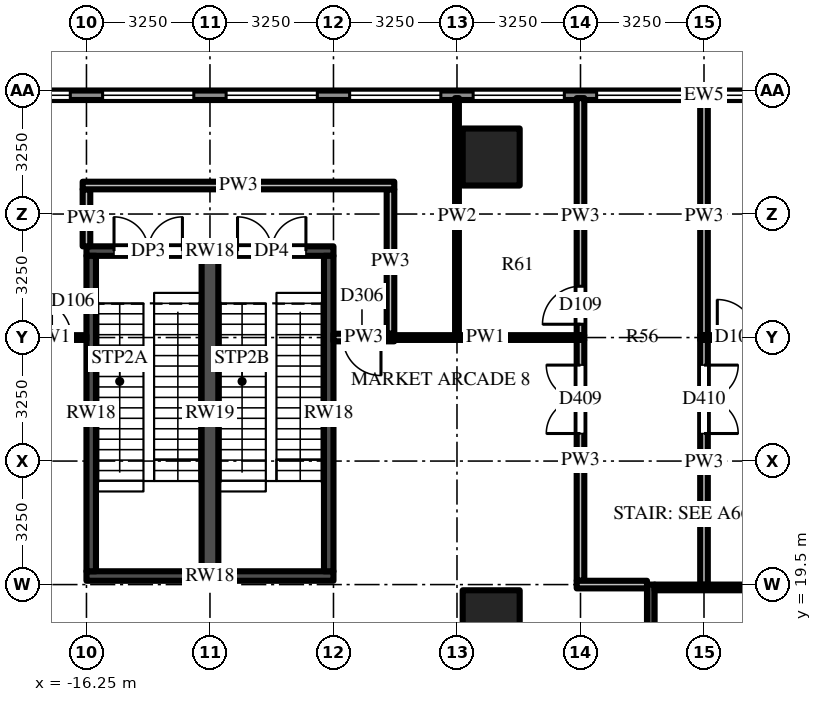
"""IFC4 building model, lengths in metres.
Left out: names, types, materials, properties, quantities, classifications, styles, units other than length and angle.
Written with IfcOpenShell. Run it as: python <this file> out.ifc"""

import sys

from ifc_helpers import new_model, si_unit, direction, frame, frame_2d, origin, origin_2d, place, context, subcontext, project, spatial, rectangle, extrude, source, transform, mapped, element, fill, save


model = new_model("IFC4")
c1 = context("Model", 3, precision=1e-05, world=origin(), true_north=direction((0.0, 1.0)))
c2 = subcontext(c1, "Body", "Model", "MODEL_VIEW")
j1 = project(units=[si_unit("LENGTHUNIT", "METRE"), si_unit("PLANEANGLEUNIT", "RADIAN")], contexts=[c1])
p1 = place(None, origin())
s1 = spatial("IfcSite", under=j1, at=p1, CompositionType="ELEMENT")
p2 = place(p1, origin())
s2 = spatial("IfcBuilding", under=s1, at=p2, CompositionType="ELEMENT")
p3 = place(p2, frame((0.0, 0.0, 24.0)))
s3 = spatial("IfcBuildingStorey", under=s2, at=p3, CompositionType="ELEMENT", Elevation=24.0)
m1 = source(origin(), c2, "Body", "SweptSolid", [
    extrude(rectangle(XDim=1.5, YDim=1.5, at=origin_2d()), origin(), (0.0, 0.0, 1.0), 5.0),
])
for number, where, z_axis, x_axis in (
    (1, (-5.6, 18.6, 0.0), (0.0, 0.0, 1.0), (1.0, 0.0, 0.0)),
    (2, (-5.6, 30.75, 0.0), (0.0, 0.0, 1.0), (1.0, 0.0, 0.0)),
):
    element("IfcColumn", number, at=place(p3, frame(where, z_axis=z_axis, x_axis=x_axis)), inside=s3, PredefinedType="COLUMN", context=c2, shape_type="MappedRepresentation", body=[
        mapped(m1, transform((0.0, 0.0, 0.0))),
    ])
m2 = source(origin(), c2, "Body", "SweptSolid", [
    extrude(rectangle(XDim=6.0, YDim=0.2, at=frame_2d((3.0, 0.0))), origin(), (0.0, 0.0, 1.0), 4.7),
])
p4 = place(p3, frame((-1.4, 13.5, 0.0), z_axis=(0.0, 0.0, 1.0), x_axis=(0.0, 1.0, 0.0)))
e3 = element("IfcWall", 3, at=p4, inside=s3, PredefinedType="SHEAR", context=c2, shape_type="MappedRepresentation", body=[
    mapped(m2, transform((0.0, 0.0, 0.0))),
])
m3 = source(origin(), c2, "Body", "SweptSolid", [
    extrude(rectangle(XDim=2.6, YDim=0.15, at=frame_2d((1.3, 0.0))), origin(), (0.0, 0.0, 1.0), 4.7),
])
p5 = place(p3, frame((-1.3, 19.425, 0.0), z_axis=(0.0, 0.0, 1.0), x_axis=(1.0, 0.0, 0.0)))
e4 = element("IfcWall", 4, at=p5, inside=s3, PredefinedType="SHEAR", context=c2, shape_type="MappedRepresentation", body=[
    mapped(m3, transform((0.0, 0.0, 0.0))),
])
m4 = source(origin(), c2, "Body", "SweptSolid", [
    extrude(rectangle(XDim=6.5, YDim=0.25, at=frame_2d((3.25, 0.0))), origin(), (0.0, 0.0, 1.0), 4.7),
])
p6 = place(p3, frame((-16.25, 28.275, 0.0), z_axis=(0.0, 0.0, 1.0), x_axis=(1.0, 0.0, 0.0)))
e5 = element("IfcWall", 5, at=p6, inside=s3, PredefinedType="SHEAR", context=c2, shape_type="MappedRepresentation", body=[
    mapped(m4, transform((0.0, 0.0, 0.0))),
])
m5 = source(origin(), c2, "Body", "SweptSolid", [
    extrude(rectangle(XDim=1.8, YDim=2.1, at=frame_2d((0.9, 1.05))), frame((0.0, 0.135, 0.0), z_axis=(0.0, -1.0, 0.0), x_axis=(1.0, 0.0, 0.0)), (0.0, 0.0, 1.0), 0.27),
])
p7 = place(p6, frame((0.725, 0.0, 0.0)))
e6 = element("IfcOpeningElement", 6, at=p7, cuts=e5, PredefinedType="OPENING", context=c2, shape_type="MappedRepresentation", body=[
    mapped(m5, transform((0.0, 0.0, 0.0))),
])
p8 = place(p6, frame((3.975, 0.0, 0.0)))
e7 = element("IfcOpeningElement", 7, at=p8, cuts=e5, PredefinedType="OPENING", context=c2, shape_type="MappedRepresentation", body=[
    mapped(m5, transform((0.0, 0.0, 0.0))),
])
p9 = place(p3, frame((-16.25, 19.725, 0.0), z_axis=(0.0, 0.0, 1.0), x_axis=(1.0, 0.0, 0.0)))
e8 = element("IfcWall", 8, at=p9, inside=s3, PredefinedType="SHEAR", context=c2, shape_type="MappedRepresentation", body=[
    mapped(m4, transform((0.0, 0.0, 0.0))),
])
m6 = source(origin(), c2, "Body", "SweptSolid", [
    extrude(rectangle(XDim=8.3, YDim=0.25, at=frame_2d((4.15, 0.0))), origin(), (0.0, 0.0, 1.0), 4.7),
])
for number, where, z_axis, x_axis in (
    (9, (-16.125, 19.85, 0.0), (0.0, 0.0, 1.0), (0.0, 1.0, 0.0)),
    (10, (-9.875, 19.85, 0.0), (0.0, 0.0, 1.0), (0.0, 1.0, 0.0)),
):
    element("IfcWall", number, at=place(p3, frame(where, z_axis=z_axis, x_axis=x_axis)), inside=s3, PredefinedType="SHEAR", context=c2, shape_type="MappedRepresentation", body=[
        mapped(m6, transform((0.0, 0.0, 0.0))),
    ])
m7 = source(origin(), c2, "Body", "SweptSolid", [
    extrude(rectangle(XDim=8.3, YDim=0.44, at=frame_2d((4.15, 0.0))), origin(), (0.0, 0.0, 1.0), 4.7),
])
p10 = place(p3, frame((-13.0, 19.85, 0.0), z_axis=(0.0, 0.0, 1.0), x_axis=(0.0, 1.0, 0.0)))
e11 = element("IfcWall", 11, at=p10, inside=s3, PredefinedType="SHEAR", context=c2, shape_type="MappedRepresentation", body=[
    mapped(m7, transform((0.0, 0.0, 0.0))),
])
m8 = source(origin(), c2, "Body", "SweptSolid", [
    extrude(rectangle(XDim=58.5, YDim=0.25, at=frame_2d((29.25, 0.0))), origin(), (0.0, 0.0, 1.0), 4.7),
])
p11 = place(p3, frame((29.25, 32.375, 0.0), z_axis=(0.0, 0.0, 1.0), x_axis=(-1.0, 0.0, 0.0)))
e12 = element("IfcWall", 12, at=p11, inside=s3, PredefinedType="SOLIDWALL", context=c2, shape_type="MappedRepresentation", body=[
    mapped(m8, transform((0.0, 0.0, 0.0))),
])
m9 = source(origin(), c2, "Body", "SweptSolid", [
    extrude(rectangle(XDim=2.4, YDim=3.3, at=frame_2d((1.2, 1.65))), frame((0.0, 0.135, 0.0), z_axis=(0.0, -1.0, 0.0), x_axis=(1.0, 0.0, 0.0)), (0.0, 0.0, 1.0), 0.27),
])
p12 = place(p11, frame((0.425, 0.0, 0.6)))
e13 = element("IfcOpeningElement", 13, at=p12, cuts=e12, PredefinedType="OPENING", context=c2, shape_type="MappedRepresentation", body=[
    mapped(m9, transform((0.0, 0.0, 0.0))),
])
p13 = place(p11, frame((3.675, 0.0, 0.6)))
e14 = element("IfcOpeningElement", 14, at=p13, cuts=e12, PredefinedType="OPENING", context=c2, shape_type="MappedRepresentation", body=[
    mapped(m9, transform((0.0, 0.0, 0.0))),
])
p14 = place(p11, frame((6.925, 0.0, 0.6)))
e15 = element("IfcOpeningElement", 15, at=p14, cuts=e12, PredefinedType="OPENING", context=c2, shape_type="MappedRepresentation", body=[
    mapped(m9, transform((0.0, 0.0, 0.0))),
])
p15 = place(p11, frame((10.175, 0.0, 0.6)))
e16 = element("IfcOpeningElement", 16, at=p15, cuts=e12, PredefinedType="OPENING", context=c2, shape_type="MappedRepresentation", body=[
    mapped(m9, transform((0.0, 0.0, 0.0))),
])
m10 = source(origin(), c2, "Body", "SweptSolid", [
    extrude(rectangle(XDim=1.8, YDim=2.4, at=frame_2d((0.9, 1.2))), frame((0.0, 0.135, 0.0), z_axis=(0.0, -1.0, 0.0), x_axis=(1.0, 0.0, 0.0)), (0.0, 0.0, 1.0), 0.27),
])
p16 = place(p11, frame((13.725, 0.0, 0.0)))
e17 = element("IfcOpeningElement", 17, at=p16, cuts=e12, PredefinedType="OPENING", context=c2, shape_type="MappedRepresentation", body=[
    mapped(m10, transform((0.0, 0.0, 0.0))),
])
p17 = place(p11, frame((16.675, 0.0, 0.6)))
e18 = element("IfcOpeningElement", 18, at=p17, cuts=e12, PredefinedType="OPENING", context=c2, shape_type="MappedRepresentation", body=[
    mapped(m9, transform((0.0, 0.0, 0.0))),
])
p18 = place(p11, frame((19.925, 0.0, 0.6)))
e19 = element("IfcOpeningElement", 19, at=p18, cuts=e12, PredefinedType="OPENING", context=c2, shape_type="MappedRepresentation", body=[
    mapped(m9, transform((0.0, 0.0, 0.0))),
])
p19 = place(p11, frame((23.175, 0.0, 0.6)))
e20 = element("IfcOpeningElement", 20, at=p19, cuts=e12, PredefinedType="OPENING", context=c2, shape_type="MappedRepresentation", body=[
    mapped(m9, transform((0.0, 0.0, 0.0))),
])
p20 = place(p11, frame((26.425, 0.0, 0.6)))
e21 = element("IfcOpeningElement", 21, at=p20, cuts=e12, PredefinedType="OPENING", context=c2, shape_type="MappedRepresentation", body=[
    mapped(m9, transform((0.0, 0.0, 0.0))),
])
p21 = place(p11, frame((29.675, 0.0, 0.6)))
e22 = element("IfcOpeningElement", 22, at=p21, cuts=e12, PredefinedType="OPENING", context=c2, shape_type="MappedRepresentation", body=[
    mapped(m9, transform((0.0, 0.0, 0.0))),
])
p22 = place(p11, frame((32.925, 0.0, 0.6)))
e23 = element("IfcOpeningElement", 23, at=p22, cuts=e12, PredefinedType="OPENING", context=c2, shape_type="MappedRepresentation", body=[
    mapped(m9, transform((0.0, 0.0, 0.0))),
])
p23 = place(p11, frame((36.175, 0.0, 0.6)))
e24 = element("IfcOpeningElement", 24, at=p23, cuts=e12, PredefinedType="OPENING", context=c2, shape_type="MappedRepresentation", body=[
    mapped(m9, transform((0.0, 0.0, 0.0))),
])
p24 = place(p11, frame((39.425, 0.0, 0.6)))
e25 = element("IfcOpeningElement", 25, at=p24, cuts=e12, PredefinedType="OPENING", context=c2, shape_type="MappedRepresentation", body=[
    mapped(m9, transform((0.0, 0.0, 0.0))),
])
p25 = place(p11, frame((42.675, 0.0, 0.6)))
e26 = element("IfcOpeningElement", 26, at=p25, cuts=e12, PredefinedType="OPENING", context=c2, shape_type="MappedRepresentation", body=[
    mapped(m9, transform((0.0, 0.0, 0.0))),
])
p26 = place(p11, frame((45.925, 0.0, 0.6)))
e27 = element("IfcOpeningElement", 27, at=p26, cuts=e12, PredefinedType="OPENING", context=c2, shape_type="MappedRepresentation", body=[
    mapped(m9, transform((0.0, 0.0, 0.0))),
])
p27 = place(p11, frame((49.175, 0.0, 0.6)))
e28 = element("IfcOpeningElement", 28, at=p27, cuts=e12, PredefinedType="OPENING", context=c2, shape_type="MappedRepresentation", body=[
    mapped(m9, transform((0.0, 0.0, 0.0))),
])
p28 = place(p11, frame((52.425, 0.0, 0.6)))
e29 = element("IfcOpeningElement", 29, at=p28, cuts=e12, PredefinedType="OPENING", context=c2, shape_type="MappedRepresentation", body=[
    mapped(m9, transform((0.0, 0.0, 0.0))),
])
p29 = place(p11, frame((55.675, 0.0, 0.6)))
e30 = element("IfcOpeningElement", 30, at=p29, cuts=e12, PredefinedType="OPENING", context=c2, shape_type="MappedRepresentation", body=[
    mapped(m9, transform((0.0, 0.0, 0.0))),
])
m11 = source(origin(), c2, "Body", "SweptSolid", [
    extrude(rectangle(XDim=1.5, YDim=0.2, at=frame_2d((0.75, 0.0))), origin(), (0.0, 0.0, 1.0), 4.7),
])
p30 = place(p3, frame((-16.25, 28.4, 0.0), z_axis=(0.0, 0.0, 1.0), x_axis=(0.0, 1.0, 0.0)))
e31 = element("IfcWall", 31, at=p30, inside=s3, PredefinedType="PARTITIONING", context=c2, shape_type="MappedRepresentation", body=[
    mapped(m11, transform((0.0, 0.0, 0.0))),
])
m12 = source(origin(), c2, "Body", "SweptSolid", [
    extrude(rectangle(XDim=3.8, YDim=0.2, at=frame_2d((1.9, 0.0))), origin(), (0.0, 0.0, 1.0), 4.274),
])
p31 = place(p3, frame((-8.25, 26.1, 0.0), z_axis=(0.0, 0.0, 1.0), x_axis=(0.0, 1.0, 0.0)))
e32 = element("IfcWall", 32, at=p31, inside=s3, PredefinedType="PARTITIONING", context=c2, shape_type="MappedRepresentation", body=[
    mapped(m12, transform((0.0, 0.0, 0.0))),
])
p32 = place(p3, frame((-6.5, 26.062, 0.0), z_axis=(0.0, 0.0, 1.0), x_axis=(0.0, 1.0, 0.0)))
e33 = element("IfcWall", 33, at=p32, inside=s3, PredefinedType="PARTITIONING", context=c2, shape_type="SweptSolid", body=[
    extrude(rectangle(XDim=6.238, YDim=0.1, at=frame_2d((3.119, 0.0))), origin(), (0.0, 0.0, 1.0), 3.762),
])
m13 = source(origin(), c2, "Body", "SweptSolid", [
    extrude(rectangle(XDim=3.188, YDim=0.2, at=frame_2d((1.594, 0.0))), origin(), (0.0, 0.0, 1.0), 4.7),
])
p33 = place(p3, frame((-3.25, 22.75, 0.0), z_axis=(0.0, 0.0, 1.0), x_axis=(0.0, 1.0, 0.0)))
e34 = element("IfcWall", 34, at=p33, inside=s3, PredefinedType="PARTITIONING", context=c2, shape_type="MappedRepresentation", body=[
    mapped(m13, transform((0.0, 0.0, 0.0))),
])
m14 = source(origin(), c2, "Body", "SweptSolid", [
    extrude(rectangle(XDim=1.8, YDim=2.1, at=frame_2d((0.9, 1.05))), frame((0.0, 0.11, 0.0), z_axis=(0.0, -1.0, 0.0), x_axis=(1.0, 0.0, 0.0)), (0.0, 0.0, 1.0), 0.22),
])
p34 = place(p33, frame((0.725, 0.0, 0.0)))
e35 = element("IfcOpeningElement", 35, at=p34, cuts=e34, PredefinedType="OPENING", context=c2, shape_type="MappedRepresentation", body=[
    mapped(m14, transform((0.0, 0.0, 0.0))),
])
m15 = source(origin(), c2, "Body", "SweptSolid", [
    extrude(rectangle(XDim=3.15, YDim=0.2, at=frame_2d((1.575, 0.0))), origin(), (0.0, 0.0, 1.0), 4.7),
])
p35 = place(p3, frame((-3.25, 19.6, 0.0), z_axis=(0.0, 0.0, 1.0), x_axis=(0.0, 1.0, 0.0)))
e36 = element("IfcWall", 36, at=p35, inside=s3, PredefinedType="PARTITIONING", context=c2, shape_type="MappedRepresentation", body=[
    mapped(m15, transform((0.0, 0.0, 0.0))),
])
m16 = source(origin(), c2, "Body", "SweptSolid", [
    extrude(rectangle(XDim=6.238, YDim=0.2, at=frame_2d((3.119, 0.0))), origin(), (0.0, 0.0, 1.0), 3.918),
])
p36 = place(p3, frame((-3.25, 26.062, 0.0), z_axis=(0.0, 0.0, 1.0), x_axis=(0.0, 1.0, 0.0)))
e37 = element("IfcWall", 37, at=p36, inside=s3, PredefinedType="PARTITIONING", context=c2, shape_type="MappedRepresentation", body=[
    mapped(m16, transform((0.0, 0.0, 0.0))),
])
m17 = source(origin(), c2, "Body", "SweptSolid", [
    extrude(rectangle(XDim=1.0, YDim=2.1, at=frame_2d((0.5, 1.05))), frame((0.0, 0.11, 0.0), z_axis=(0.0, -1.0, 0.0), x_axis=(1.0, 0.0, 0.0)), (0.0, 0.0, 1.0), 0.22),
])
p37 = place(p36, frame((0.288, 0.0, 0.0)))
e38 = element("IfcOpeningElement", 38, at=p37, cuts=e37, PredefinedType="OPENING", context=c2, shape_type="MappedRepresentation", body=[
    mapped(m17, transform((0.0, 0.0, 0.0))),
])
m18 = source(origin(), c2, "Body", "SweptSolid", [
    extrude(rectangle(XDim=3.188, YDim=0.2, at=frame_2d((1.594, 0.0))), origin(), (0.0, 0.0, 1.0), 3.996),
])
p38 = place(p3, frame((0.0, 25.938, 0.0), z_axis=(0.0, 0.0, 1.0), x_axis=(0.0, -1.0, 0.0)))
e39 = element("IfcWall", 39, at=p38, inside=s3, PredefinedType="PARTITIONING", context=c2, shape_type="MappedRepresentation", body=[
    mapped(m18, transform((0.0, 0.0, 0.0))),
])
p39 = place(p38, frame((0.663, 0.0, 0.0)))
e40 = element("IfcOpeningElement", 40, at=p39, cuts=e39, PredefinedType="OPENING", context=c2, shape_type="MappedRepresentation", body=[
    mapped(m14, transform((0.0, 0.0, 0.0))),
])
p40 = place(p3, frame((0.0, 32.3, 0.0), z_axis=(0.0, 0.0, 1.0), x_axis=(0.0, -1.0, 0.0)))
e41 = element("IfcWall", 41, at=p40, inside=s3, PredefinedType="PARTITIONING", context=c2, shape_type="MappedRepresentation", body=[
    mapped(m16, transform((0.0, 0.0, 0.0))),
])
m19 = source(origin(), c2, "Body", "SweptSolid", [
    extrude(rectangle(XDim=3.25, YDim=0.2, at=frame_2d((1.625, 0.0))), origin(), (0.0, 0.0, 1.0), 3.996),
])
p41 = place(p3, frame((0.0, 19.5, 0.0), z_axis=(0.0, 0.0, 1.0), x_axis=(0.0, 1.0, 0.0)))
e42 = element("IfcWall", 42, at=p41, inside=s3, PredefinedType="PARTITIONING", context=c2, shape_type="MappedRepresentation", body=[
    mapped(m19, transform((0.0, 0.0, 0.0))),
])
m20 = source(origin(), c2, "Body", "SweptSolid", [
    extrude(rectangle(XDim=1.85, YDim=0.2, at=frame_2d((0.925, 0.0))), origin(), (0.0, 0.0, 1.0), 3.996),
])
p42 = place(p3, frame((-1.5, 19.5, 0.0), z_axis=(0.0, 0.0, 1.0), x_axis=(-1.0, 0.0, 0.0)))
e43 = element("IfcWall", 43, at=p42, inside=s3, PredefinedType="PARTITIONING", context=c2, shape_type="MappedRepresentation", body=[
    mapped(m20, transform((0.0, 0.0, 0.0))),
])
m21 = source(origin(), c2, "Body", "SweptSolid", [
    extrude(rectangle(XDim=1.6, YDim=0.2, at=frame_2d((0.8, 0.0))), origin(), (0.0, 0.0, 1.0), 4.7),
])
p43 = place(p3, frame((-8.15, 26.0, 0.0), z_axis=(0.0, 0.0, 1.0), x_axis=(-1.0, 0.0, 0.0)))
e44 = element("IfcWall", 44, at=p43, inside=s3, PredefinedType="PARTITIONING", context=c2, shape_type="MappedRepresentation", body=[
    mapped(m21, transform((0.0, 0.0, 0.0))),
])
p44 = place(p43, frame((0.35, 0.0, 0.0)))
e45 = element("IfcOpeningElement", 45, at=p44, cuts=e44, PredefinedType="OPENING", context=c2, shape_type="MappedRepresentation", body=[
    mapped(m17, transform((0.0, 0.0, 0.0))),
])
m22 = source(origin(), c2, "Body", "SweptSolid", [
    extrude(rectangle(XDim=1.85, YDim=0.125, at=frame_2d((0.925, 0.0))), origin(), (0.0, 0.0, 1.0), 4.7),
])
p45 = place(p3, frame((-18.1, 26.0, 0.0), z_axis=(0.0, 0.0, 1.0), x_axis=(1.0, 0.0, 0.0)))
e46 = element("IfcWall", 46, at=p45, inside=s3, PredefinedType="PARTITIONING", context=c2, shape_type="MappedRepresentation", body=[
    mapped(m22, transform((0.0, 0.0, 0.0))),
])
m23 = source(origin(), c2, "Body", "SweptSolid", [
    extrude(rectangle(XDim=1.0, YDim=2.1, at=frame_2d((0.5, 1.05))), frame((0.0, 0.073, 0.0), z_axis=(0.0, -1.0, 0.0), x_axis=(1.0, 0.0, 0.0)), (0.0, 0.0, 1.0), 0.145),
])
p46 = place(p45, frame((0.45, 0.0, 0.0)))
e47 = element("IfcOpeningElement", 47, at=p46, cuts=e46, PredefinedType="OPENING", context=c2, shape_type="MappedRepresentation", body=[
    mapped(m23, transform((0.0, 0.0, 0.0))),
])
m24 = source(origin(), c2, "Body", "SweptSolid", [
    extrude(rectangle(XDim=5.2, YDim=0.125, at=frame_2d((2.6, 0.0))), origin(), (0.0, 0.0, 1.0), 3.762),
])
p47 = place(p3, frame((-8.35, 26.0, 0.0), z_axis=(0.0, 0.0, 1.0), x_axis=(1.0, 0.0, 0.0)))
e48 = element("IfcWall", 48, at=p47, inside=s3, PredefinedType="PARTITIONING", context=c2, shape_type="MappedRepresentation", body=[
    mapped(m24, transform((0.0, 0.0, 0.0))),
])
m25 = source(origin(), c2, "Body", "SweptSolid", [
    extrude(rectangle(XDim=8.45, YDim=0.125, at=frame_2d((4.225, 0.0))), origin(), (0.0, 0.0, 1.0), 3.762),
])
p48 = place(p3, frame((-0.1, 26.0, 0.0), z_axis=(0.0, 0.0, 1.0), x_axis=(1.0, 0.0, 0.0)))
e49 = element("IfcWall", 49, at=p48, inside=s3, PredefinedType="PARTITIONING", context=c2, shape_type="MappedRepresentation", body=[
    mapped(m25, transform((0.0, 0.0, 0.0))),
])
p49 = place(p48, frame((0.45, 0.0, 0.0)))
e50 = element("IfcOpeningElement", 50, at=p49, cuts=e49, PredefinedType="OPENING", context=c2, shape_type="MappedRepresentation", body=[
    mapped(m23, transform((0.0, 0.0, 0.0))),
])
m26 = source(origin(), c2, "Body", "SweptSolid", [
    extrude(rectangle(XDim=8.2, YDim=0.2, at=frame_2d((4.1, 0.0))), origin(), (0.0, 0.0, 1.0), 4.7),
])
p50 = place(p3, frame((-8.15, 30.0, 0.0), z_axis=(0.0, 0.0, 1.0), x_axis=(-1.0, 0.0, 0.0)))
e51 = element("IfcWall", 51, at=p50, inside=s3, PredefinedType="PARTITIONING", context=c2, shape_type="MappedRepresentation", body=[
    mapped(m26, transform((0.0, 0.0, 0.0))),
])
m27 = source(origin(), c2, "Body", "SweptSolid", [
    extrude(rectangle(XDim=1.8, YDim=2.1, at=frame_2d((0.9, 1.05))), frame((0.0, 0.025, 0.0), z_axis=(0.0, -1.0, 0.0), x_axis=(1.0, 0.0, 0.0)), (0.0, 0.0, 1.0), 0.05),
])
p51 = place(p7, origin())
e52 = element("IfcDoor", 52, at=p51, inside=s3, OperationType="DOUBLE_DOOR_SINGLE_SWING", PredefinedType="DOOR", context=c2, shape_type="MappedRepresentation", body=[
    mapped(m27, transform((0.0, 0.0, 0.0))),
])
fill(e6, e52)
p52 = place(p8, origin())
e53 = element("IfcDoor", 53, at=p52, inside=s3, OperationType="DOUBLE_DOOR_SINGLE_SWING", PredefinedType="DOOR", context=c2, shape_type="MappedRepresentation", body=[
    mapped(m27, transform((0.0, 0.0, 0.0))),
])
fill(e7, e53)
m28 = source(origin(), c2, "Body", "SweptSolid", [
    extrude(rectangle(XDim=2.4, YDim=3.3, at=frame_2d((1.2, 1.65))), frame((0.0, 0.03, 0.0), z_axis=(0.0, -1.0, 0.0), x_axis=(1.0, 0.0, 0.0)), (0.0, 0.0, 1.0), 0.06),
])
p53 = place(p20, origin())
e54 = element("IfcWindow", 54, at=p53, inside=s3, PartitioningType="SINGLE_PANEL", PredefinedType="WINDOW", context=c2, shape_type="MappedRepresentation", body=[
    mapped(m28, transform((0.0, 0.0, 0.0))),
])
fill(e21, e54)
p54 = place(p21, origin())
e55 = element("IfcWindow", 55, at=p54, inside=s3, PartitioningType="SINGLE_PANEL", PredefinedType="WINDOW", context=c2, shape_type="MappedRepresentation", body=[
    mapped(m28, transform((0.0, 0.0, 0.0))),
])
fill(e22, e55)
p55 = place(p22, origin())
e56 = element("IfcWindow", 56, at=p55, inside=s3, PartitioningType="SINGLE_PANEL", PredefinedType="WINDOW", context=c2, shape_type="MappedRepresentation", body=[
    mapped(m28, transform((0.0, 0.0, 0.0))),
])
fill(e23, e56)
p56 = place(p23, origin())
e57 = element("IfcWindow", 57, at=p56, inside=s3, PartitioningType="SINGLE_PANEL", PredefinedType="WINDOW", context=c2, shape_type="MappedRepresentation", body=[
    mapped(m28, transform((0.0, 0.0, 0.0))),
])
fill(e24, e57)
p57 = place(p24, origin())
e58 = element("IfcWindow", 58, at=p57, inside=s3, PartitioningType="SINGLE_PANEL", PredefinedType="WINDOW", context=c2, shape_type="MappedRepresentation", body=[
    mapped(m28, transform((0.0, 0.0, 0.0))),
])
fill(e25, e58)
p58 = place(p25, origin())
e59 = element("IfcWindow", 59, at=p58, inside=s3, PartitioningType="SINGLE_PANEL", PredefinedType="WINDOW", context=c2, shape_type="MappedRepresentation", body=[
    mapped(m28, transform((0.0, 0.0, 0.0))),
])
fill(e26, e59)
p59 = place(p26, origin())
e60 = element("IfcWindow", 60, at=p59, inside=s3, PartitioningType="SINGLE_PANEL", PredefinedType="WINDOW", context=c2, shape_type="MappedRepresentation", body=[
    mapped(m28, transform((0.0, 0.0, 0.0))),
])
fill(e27, e60)
p60 = place(p34, origin())
e61 = element("IfcDoor", 61, at=p60, inside=s3, OperationType="DOUBLE_DOOR_SINGLE_SWING", PredefinedType="DOOR", context=c2, shape_type="MappedRepresentation", body=[
    mapped(m27, transform((0.0, 0.0, 0.0))),
])
fill(e35, e61)
p61 = place(p39, origin())
e62 = element("IfcDoor", 62, at=p61, inside=s3, OperationType="DOUBLE_DOOR_SINGLE_SWING", PredefinedType="DOOR", context=c2, shape_type="MappedRepresentation", body=[
    mapped(m27, transform((0.0, 0.0, 0.0))),
])
fill(e40, e62)
m29 = source(origin(), c2, "Body", "SweptSolid", [
    extrude(rectangle(XDim=1.0, YDim=2.1, at=frame_2d((0.5, 1.05))), frame((0.0, 0.025, 0.0), z_axis=(0.0, -1.0, 0.0), x_axis=(1.0, 0.0, 0.0)), (0.0, 0.0, 1.0), 0.05),
])
p62 = place(p46, origin())
e63 = element("IfcDoor", 63, at=p62, inside=s3, OperationType="SINGLE_SWING_LEFT", PredefinedType="DOOR", context=c2, shape_type="MappedRepresentation", body=[
    mapped(m29, transform((0.0, 0.0, 0.0))),
])
fill(e47, e63)
p63 = place(p44, origin())
e64 = element("IfcDoor", 64, at=p63, inside=s3, OperationType="SINGLE_SWING_LEFT", PredefinedType="DOOR", context=c2, shape_type="MappedRepresentation", body=[
    mapped(m29, transform((0.0, 0.0, 0.0))),
])
fill(e45, e64)
p64 = place(p49, origin())
e65 = element("IfcDoor", 65, at=p64, inside=s3, OperationType="SINGLE_SWING_LEFT", PredefinedType="DOOR", context=c2, shape_type="MappedRepresentation", body=[
    mapped(m29, transform((0.0, 0.0, 0.0))),
])
fill(e50, e65)
p65 = place(p37, origin())
e66 = element("IfcDoor", 66, at=p65, inside=s3, OperationType="SINGLE_SWING_LEFT", PredefinedType="DOOR", context=c2, shape_type="MappedRepresentation", body=[
    mapped(m29, transform((0.0, 0.0, 0.0))),
])
fill(e38, e66)
save(model, sys.argv[1])
